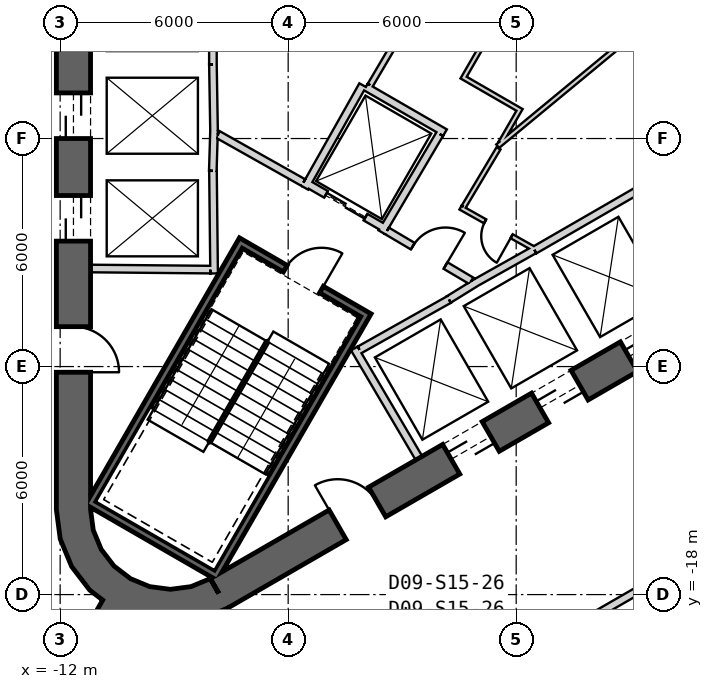
"""IFC4 building model, lengths in metres.
Left out: names, types, materials, properties, quantities, classifications, styles, units other than length and angle.
Written with IfcOpenShell. Run it as: python <this file> out.ifc"""

import sys

from ifc_helpers import new_model, si_unit, direction, frame, frame_2d, origin, place, context, subcontext, project, spatial, polyline, rectangle, outline, extrude, element, fill, save


model = new_model("IFC4")
c1 = context("Model", 3, precision=1e-05, world=origin(), true_north=direction((0.0, 1.0)))
c2 = subcontext(c1, "Body", "Model", "MODEL_VIEW")
j1 = project(units=[si_unit("LENGTHUNIT", "METRE"), si_unit("PLANEANGLEUNIT", "RADIAN")], contexts=[c1])
p1 = place(None, origin())
s1 = spatial("IfcSite", under=j1, at=p1, CompositionType="ELEMENT")
p2 = place(p1, origin())
s2 = spatial("IfcBuilding", under=s1, at=p2, CompositionType="ELEMENT")
p3 = place(p2, frame((0.0, 0.0, 241.2)))
s3 = spatial("IfcBuildingStorey", under=s2, at=p3, CompositionType="ELEMENT", Elevation=241.2)
p4 = place(p3, frame((-11.65, 15.762, 0.0), z_axis=(0.0, 0.0, 1.0), x_axis=(0.0, -1.0, 0.0)))
e1 = element("IfcWall", 1, at=p4, inside=s3, PredefinedType="SHEAR", context=c2, shape_type="SweptSolid", body=[
    extrude(rectangle(XDim=31.523, YDim=0.9, at=frame_2d((15.762, 0.0))), origin(), (0.0, 0.0, 1.0), 4.0),
])
p5 = place(p4, frame((7.062, 0.0, 0.0)))
e2 = element("IfcOpeningElement", 2, at=p5, cuts=e1, PredefinedType="OPENING", context=c2, shape_type="SweptSolid", body=[
    extrude(rectangle(XDim=1.2, YDim=2.4, at=frame_2d((0.6, 1.2))), frame((0.0, 0.46, 0.0), z_axis=(0.0, -1.0, 0.0), x_axis=(1.0, 0.0, 0.0)), (0.0, 0.0, 1.0), 0.92),
])
p6 = place(p4, frame((9.762, 0.0, 0.0)))
e3 = element("IfcOpeningElement", 3, at=p6, cuts=e1, PredefinedType="OPENING", context=c2, shape_type="SweptSolid", body=[
    extrude(rectangle(XDim=1.2, YDim=2.4, at=frame_2d((0.6, 1.2))), frame((0.0, 0.46, 0.0), z_axis=(0.0, -1.0, 0.0), x_axis=(1.0, 0.0, 0.0)), (0.0, 0.0, 1.0), 0.92),
])
p7 = place(p4, frame((12.462, 0.0, 0.0)))
e4 = element("IfcOpeningElement", 4, at=p7, cuts=e1, PredefinedType="OPENING", context=c2, shape_type="SweptSolid", body=[
    extrude(rectangle(XDim=1.2, YDim=2.4, at=frame_2d((0.6, 1.2))), frame((0.0, 0.46, 0.0), z_axis=(0.0, -1.0, 0.0), x_axis=(1.0, 0.0, 0.0)), (0.0, 0.0, 1.0), 0.92),
])
p8 = place(p4, frame((15.162, 0.0, 0.0)))
e5 = element("IfcOpeningElement", 5, at=p8, cuts=e1, PredefinedType="OPENING", context=c2, shape_type="SweptSolid", body=[
    extrude(rectangle(XDim=1.2, YDim=2.4, at=frame_2d((0.6, 1.2))), frame((0.0, 0.46, 0.0), z_axis=(0.0, -1.0, 0.0), x_axis=(1.0, 0.0, 0.0)), (0.0, 0.0, 1.0), 0.92),
])
p9 = place(p4, frame((17.862, 0.0, 0.0)))
e6 = element("IfcOpeningElement", 6, at=p9, cuts=e1, PredefinedType="OPENING", context=c2, shape_type="SweptSolid", body=[
    extrude(rectangle(XDim=1.2, YDim=2.4, at=frame_2d((0.6, 1.2))), frame((0.0, 0.46, 0.0), z_axis=(0.0, -1.0, 0.0), x_axis=(1.0, 0.0, 0.0)), (0.0, 0.0, 1.0), 0.92),
])
p10 = place(p4, frame((20.562, 0.0, 0.0)))
e7 = element("IfcOpeningElement", 7, at=p10, cuts=e1, PredefinedType="OPENING", context=c2, shape_type="SweptSolid", body=[
    extrude(rectangle(XDim=1.2, YDim=2.4, at=frame_2d((0.6, 1.2))), frame((0.0, 0.46, 0.0), z_axis=(0.0, -1.0, 0.0), x_axis=(1.0, 0.0, 0.0)), (0.0, 0.0, 1.0), 0.92),
])
p11 = place(p4, frame((23.262, 0.0, 0.0)))
e8 = element("IfcOpeningElement", 8, at=p11, cuts=e1, PredefinedType="OPENING", context=c2, shape_type="SweptSolid", body=[
    extrude(rectangle(XDim=1.2, YDim=2.4, at=frame_2d((0.6, 1.2))), frame((0.0, 0.46, 0.0), z_axis=(0.0, -1.0, 0.0), x_axis=(1.0, 0.0, 0.0)), (0.0, 0.0, 1.0), 0.92),
])
p12 = place(p4, frame((3.612, 0.0, 0.0)))
e9 = element("IfcOpeningElement", 9, at=p12, cuts=e1, PredefinedType="OPENING", context=c2, shape_type="SweptSolid", body=[
    extrude(rectangle(XDim=1.2, YDim=2.4, at=frame_2d((0.6, 1.2))), frame((0.0, 0.46, 0.0), z_axis=(0.0, -1.0, 0.0), x_axis=(1.0, 0.0, 0.0)), (0.0, 0.0, 1.0), 0.92),
])
p13 = place(p4, frame((26.712, 0.0, 0.0)))
e10 = element("IfcOpeningElement", 10, at=p13, cuts=e1, PredefinedType="OPENING", context=c2, shape_type="SweptSolid", body=[
    extrude(rectangle(XDim=1.2, YDim=2.4, at=frame_2d((0.6, 1.2))), frame((0.0, 0.46, 0.0), z_axis=(0.0, -1.0, 0.0), x_axis=(1.0, 0.0, 0.0)), (0.0, 0.0, 1.0), 0.92),
])
p14 = place(p3, frame((-7.825, -17.97, 0.0), z_axis=(0.0, 0.0, 1.0), x_axis=(0.866028369851, 0.499994862586, 0.0)))
e11 = element("IfcWall", 11, at=p14, inside=s3, PredefinedType="SHEAR", context=c2, shape_type="SweptSolid", body=[
    extrude(rectangle(XDim=31.523, YDim=0.9, at=frame_2d((15.762, 0.0))), origin(), (0.0, 0.0, 1.0), 4.0),
])
p15 = place(p14, frame((7.062, 0.0, 0.0)))
e12 = element("IfcOpeningElement", 12, at=p15, cuts=e11, PredefinedType="OPENING", context=c2, shape_type="SweptSolid", body=[
    extrude(rectangle(XDim=1.2, YDim=2.4, at=frame_2d((0.6, 1.2))), frame((0.0, 0.46, 0.0), z_axis=(0.0, -1.0, 0.0), x_axis=(1.0, 0.0, 0.0)), (0.0, 0.0, 1.0), 0.92),
])
p16 = place(p14, frame((9.762, 0.0, 0.0)))
e13 = element("IfcOpeningElement", 13, at=p16, cuts=e11, PredefinedType="OPENING", context=c2, shape_type="SweptSolid", body=[
    extrude(rectangle(XDim=1.2, YDim=2.4, at=frame_2d((0.6, 1.2))), frame((0.0, 0.46, 0.0), z_axis=(0.0, -1.0, 0.0), x_axis=(1.0, 0.0, 0.0)), (0.0, 0.0, 1.0), 0.92),
])
p17 = place(p14, frame((12.462, 0.0, 0.0)))
e14 = element("IfcOpeningElement", 14, at=p17, cuts=e11, PredefinedType="OPENING", context=c2, shape_type="SweptSolid", body=[
    extrude(rectangle(XDim=1.2, YDim=2.4, at=frame_2d((0.6, 1.2))), frame((0.0, 0.46, 0.0), z_axis=(0.0, -1.0, 0.0), x_axis=(1.0, 0.0, 0.0)), (0.0, 0.0, 1.0), 0.92),
])
p18 = place(p14, frame((15.162, 0.0, 0.0)))
e15 = element("IfcOpeningElement", 15, at=p18, cuts=e11, PredefinedType="OPENING", context=c2, shape_type="SweptSolid", body=[
    extrude(rectangle(XDim=1.2, YDim=2.4, at=frame_2d((0.6, 1.2))), frame((0.0, 0.46, 0.0), z_axis=(0.0, -1.0, 0.0), x_axis=(1.0, 0.0, 0.0)), (0.0, 0.0, 1.0), 0.92),
])
p19 = place(p14, frame((17.862, 0.0, 0.0)))
e16 = element("IfcOpeningElement", 16, at=p19, cuts=e11, PredefinedType="OPENING", context=c2, shape_type="SweptSolid", body=[
    extrude(rectangle(XDim=1.2, YDim=2.4, at=frame_2d((0.6, 1.2))), frame((0.0, 0.46, 0.0), z_axis=(0.0, -1.0, 0.0), x_axis=(1.0, 0.0, 0.0)), (0.0, 0.0, 1.0), 0.92),
])
p20 = place(p14, frame((20.562, 0.0, 0.0)))
e17 = element("IfcOpeningElement", 17, at=p20, cuts=e11, PredefinedType="OPENING", context=c2, shape_type="SweptSolid", body=[
    extrude(rectangle(XDim=1.2, YDim=2.4, at=frame_2d((0.6, 1.2))), frame((0.0, 0.46, 0.0), z_axis=(0.0, -1.0, 0.0), x_axis=(1.0, 0.0, 0.0)), (0.0, 0.0, 1.0), 0.92),
])
p21 = place(p14, frame((26.712, 0.0, 0.0)))
e18 = element("IfcOpeningElement", 18, at=p21, cuts=e11, PredefinedType="OPENING", context=c2, shape_type="SweptSolid", body=[
    extrude(rectangle(XDim=1.2, YDim=2.4, at=frame_2d((0.6, 1.2))), frame((0.0, 0.46, 0.0), z_axis=(0.0, -1.0, 0.0), x_axis=(1.0, 0.0, 0.0)), (0.0, 0.0, 1.0), 0.92),
])
p22 = place(p14, frame((3.612, 0.0, 0.0)))
e19 = element("IfcOpeningElement", 19, at=p22, cuts=e11, PredefinedType="OPENING", context=c2, shape_type="SweptSolid", body=[
    extrude(rectangle(XDim=1.2, YDim=2.4, at=frame_2d((0.6, 1.2))), frame((0.0, 0.46, 0.0), z_axis=(0.0, -1.0, 0.0), x_axis=(1.0, 0.0, 0.0)), (0.0, 0.0, 1.0), 0.92),
])
p23 = place(p3, origin())
e20 = element("IfcWall", 20, at=p23, inside=s3, PredefinedType="SHEAR", context=c2, shape_type="SweptSolid", body=[
    extrude(outline(polyline([(-12.1, -15.762), (-11.998, -16.538), (-11.698, -17.262), (-11.221, -17.883), (-10.6, -18.36), (-9.876, -18.659), (-9.1, -18.762), (-8.323, -18.659), (-7.6, -18.36), (-8.05, -17.58), (-8.556, -17.79), (-9.1, -17.862), (-9.644, -17.79), (-10.15, -17.58), (-10.585, -17.247), (-10.919, -16.812), (-11.128, -16.305), (-11.2, -15.762), (-12.1, -15.762)])), origin(), (0.0, 0.0, 1.0), 4.0),
])
p24 = place(p3, frame((-10.575, -18.316, 0.0), z_axis=(0.0, 0.0, 1.0), x_axis=(-0.500002931134, -0.866023711487, 0.0)))
e21 = element("IfcWall", 21, at=p24, inside=s3, PredefinedType="SHEAR", context=c2, shape_type="SweptSolid", body=[
    extrude(rectangle(XDim=10.9, YDim=0.7, at=frame_2d((5.45, 0.0))), origin(), (0.0, 0.0, 1.0), 4.0),
])
p25 = place(p3, frame((-7.98, 4.05, 0.0), z_axis=(0.0, 0.0, 1.0), x_axis=(0.0, -1.0, 0.0)))
e22 = element("IfcWall", 22, at=p25, inside=s3, PredefinedType="PLUMBINGWALL", context=c2, shape_type="SweptSolid", body=[
    extrude(rectangle(XDim=8.1, YDim=0.2, at=frame_2d((4.05, 0.0))), origin(), (0.0, 0.0, 1.0), 3.7),
])
p26 = place(p3, frame((-7.95, -5.772, 0.0), z_axis=(0.0, 0.0, 1.0), x_axis=(-0.030803413295, -0.999525462272, 0.0)))
e23 = element("IfcWall", 23, at=p26, inside=s3, PredefinedType="PLUMBINGWALL", context=c2, shape_type="SweptSolid", body=[
    extrude(rectangle(XDim=1.078, YDim=0.2, at=frame_2d((0.539, 0.0))), origin(), (0.0, 0.0, 1.0), 3.7),
])
p27 = place(p3, frame((-7.98, -4.05, 0.0), z_axis=(0.0, 0.0, 1.0), x_axis=(0.016809909365, -0.999858703491, 0.0)))
e24 = element("IfcWall", 24, at=p27, inside=s3, PredefinedType="PLUMBINGWALL", context=c2, shape_type="SweptSolid", body=[
    extrude(rectangle(XDim=1.844, YDim=0.2, at=frame_2d((0.922, 0.0))), origin(), (0.0, 0.0, 1.0), 3.7),
])
p28 = place(p3, frame((-7.979, -6.85, 0.0), z_axis=(0.0, 0.0, 1.0), x_axis=(0.011121475088, -0.999938154483, 0.0)))
e25 = element("IfcWall", 25, at=p28, inside=s3, PredefinedType="PLUMBINGWALL", context=c2, shape_type="SweptSolid", body=[
    extrude(rectangle(XDim=2.7, YDim=0.2, at=frame_2d((1.35, 0.0))), origin(), (0.0, 0.0, 1.0), 3.7),
])
p29 = place(p3, frame((-8.05, -9.449, 0.0), z_axis=(0.0, 0.0, 1.0), x_axis=(-0.999957467379, 0.009222983926, 0.0)))
e26 = element("IfcWall", 26, at=p29, inside=s3, PredefinedType="PLUMBINGWALL", context=c2, shape_type="SweptSolid", body=[
    extrude(rectangle(XDim=3.15, YDim=0.2, at=frame_2d((1.575, 0.0))), origin(), (0.0, 0.0, 1.0), 3.7),
])
p30 = place(p3, frame((0.483, -8.936, 0.0), z_axis=(0.0, 0.0, 1.0), x_axis=(0.866030989016, 0.499990325971, 0.0)))
e27 = element("IfcWall", 27, at=p30, inside=s3, PredefinedType="PLUMBINGWALL", context=c2, shape_type="SweptSolid", body=[
    extrude(rectangle(XDim=8.1, YDim=0.2, at=frame_2d((4.05, 0.0))), origin(), (0.0, 0.0, 1.0), 3.7),
])
p31 = place(p3, frame((-2.558, -14.409, 0.0), z_axis=(0.0, 0.0, 1.0), x_axis=(-0.507997497166, 0.861358544901, 0.0)))
e28 = element("IfcWall", 28, at=p31, inside=s3, PredefinedType="PLUMBINGWALL", context=c2, shape_type="SweptSolid", body=[
    extrude(rectangle(XDim=3.35, YDim=0.2, at=frame_2d((1.675, 0.0))), origin(), (0.0, 0.0, 1.0), 3.7),
])
p32 = place(p3, frame((-1.769, -10.237, 0.0), z_axis=(0.0, 0.0, 1.0), x_axis=(-0.871534483978, -0.490334215854, 0.0)))
e29 = element("IfcWall", 29, at=p32, inside=s3, PredefinedType="PLUMBINGWALL", context=c2, shape_type="SweptSolid", body=[
    extrude(rectangle(XDim=2.7, YDim=0.2, at=frame_2d((1.35, 0.0))), origin(), (0.0, 0.0, 1.0), 3.7),
])
p33 = place(p3, frame((-1.024, -9.771, 0.0), z_axis=(0.0, 0.0, 1.0), x_axis=(-0.850348075135, -0.526220629693, 0.0)))
e30 = element("IfcWall", 30, at=p33, inside=s3, PredefinedType="PLUMBINGWALL", context=c2, shape_type="SweptSolid", body=[
    extrude(rectangle(XDim=0.878, YDim=0.2, at=frame_2d((0.439, 0.0))), origin(), (0.0, 0.0, 1.0), 3.7),
])
p34 = place(p3, frame((-1.13, -9.832, 0.0), z_axis=(0.0, 0.0, 1.0), x_axis=(0.871988740738, 0.489525929882, 0.0)))
e31 = element("IfcWall", 31, at=p34, inside=s3, PredefinedType="PLUMBINGWALL", context=c2, shape_type="SweptSolid", body=[
    extrude(rectangle(XDim=1.845, YDim=0.2, at=frame_2d((0.922, 0.0))), origin(), (0.0, 0.0, 1.0), 3.7),
])
p35 = place(p3, frame((-3.905, -10.563, -0.3), z_axis=(0.0, 0.0, 1.0), x_axis=(-0.500012932018, -0.866017937352, 0.0)))
e32 = element("IfcWall", 32, at=p35, inside=s3, PredefinedType="SHEAR", context=c2, shape_type="SweptSolid", body=[
    extrude(rectangle(XDim=8.1, YDim=0.2, at=frame_2d((4.05, 0.0))), origin(), (0.0, 0.0, 1.0), 4.0),
])
p36 = place(p3, frame((-11.282, -15.541, -0.3), z_axis=(0.0, 0.0, 1.0), x_axis=(0.866000483506, -0.500043160704, 0.0)))
e33 = element("IfcWall", 33, at=p36, inside=s3, PredefinedType="SHEAR", context=c2, shape_type="SweptSolid", body=[
    extrude(rectangle(XDim=3.8, YDim=0.2, at=frame_2d((1.9, 0.0))), origin(), (0.0, 0.0, 1.0), 4.0),
])
p37 = place(p3, frame((-7.196, -8.663, -0.3), z_axis=(0.0, 0.0, 1.0), x_axis=(-0.499997992926, -0.866026562566, 0.0)))
e34 = element("IfcWall", 34, at=p37, inside=s3, PredefinedType="SHEAR", context=c2, shape_type="SweptSolid", body=[
    extrude(rectangle(XDim=7.9, YDim=0.2, at=frame_2d((3.95, 0.0))), origin(), (0.0, 0.0, 1.0), 4.0),
])
p38 = place(p3, frame((-4.041, -10.599, -0.3), z_axis=(0.0, 0.0, 1.0), x_axis=(-0.866047807691, 0.499961193289, 0.0)))
e35 = element("IfcWall", 35, at=p38, inside=s3, PredefinedType="SHEAR", context=c2, shape_type="SweptSolid", body=[
    extrude(rectangle(XDim=3.6, YDim=0.2, at=frame_2d((1.8, 0.0))), origin(), (0.0, 0.0, 1.0), 4.0),
])
p39 = place(p38, frame((1.25, 0.0, 0.3)))
e36 = element("IfcOpeningElement", 36, at=p39, cuts=e35, PredefinedType="OPENING", context=c2, shape_type="SweptSolid", body=[
    extrude(rectangle(XDim=1.1, YDim=2.1, at=frame_2d((0.55, 1.05))), frame((0.0, 0.11, 0.0), z_axis=(0.0, -1.0, 0.0), x_axis=(1.0, 0.0, 0.0)), (0.0, 0.0, 1.0), 0.22),
])
p40 = place(p3, frame((-3.446, -8.368, 0.0), z_axis=(0.0, 0.0, 1.0), x_axis=(-0.866024647952, 0.500001309137, 0.0)))
e37 = element("IfcWall", 37, at=p40, inside=s3, PredefinedType="PLUMBINGWALL", context=c2, shape_type="SweptSolid", body=[
    extrude(rectangle(XDim=2.4, YDim=0.2, at=frame_2d((1.2, 0.0))), origin(), (0.0, 0.0, 1.0), 3.7),
])
p41 = place(p40, frame((0.6, 0.0, 0.0)))
e38 = element("IfcOpeningElement", 38, at=p41, cuts=e37, PredefinedType="OPENING", context=c2, shape_type="SweptSolid", body=[
    extrude(rectangle(XDim=1.2, YDim=2.4, at=frame_2d((0.6, 1.2))), frame((0.0, 0.11, 0.0), z_axis=(0.0, -1.0, 0.0), x_axis=(1.0, 0.0, 0.0)), (0.0, 0.0, 1.0), 0.22),
])
p42 = place(p3, frame((-5.562, -7.296, 0.0), z_axis=(0.0, 0.0, 1.0), x_axis=(0.491322718731, 0.870977603649, 0.0)))
e39 = element("IfcWall", 39, at=p42, inside=s3, PredefinedType="PLUMBINGWALL", context=c2, shape_type="SweptSolid", body=[
    extrude(rectangle(XDim=3.1, YDim=0.2, at=frame_2d((1.55, 0.0))), origin(), (0.0, 0.0, 1.0), 3.7),
])
p43 = place(p3, frame((-3.957, -4.644, 0.0), z_axis=(0.0, 0.0, 1.0), x_axis=(0.865991127953, -0.500059362782, 0.0)))
e40 = element("IfcWall", 40, at=p43, inside=s3, PredefinedType="PLUMBINGWALL", context=c2, shape_type="SweptSolid", body=[
    extrude(rectangle(XDim=2.405, YDim=0.2, at=frame_2d((1.202, 0.0))), origin(), (0.0, 0.0, 1.0), 3.7),
])
p44 = place(p3, frame((-2.012, -5.882, 0.0), z_axis=(0.0, 0.0, 1.0), x_axis=(-0.508619639323, -0.860991325447, 0.0)))
e41 = element("IfcWall", 41, at=p44, inside=s3, PredefinedType="PLUMBINGWALL", context=c2, shape_type="SweptSolid", body=[
    extrude(rectangle(XDim=3.0, YDim=0.2, at=frame_2d((1.5, 0.0))), origin(), (0.0, 0.0, 1.0), 3.7),
])
p45 = place(p3, frame((-7.849, -5.894, 0.0), z_axis=(0.0, 0.0, 1.0), x_axis=(0.871340486379, -0.490678873396, 0.0)))
e42 = element("IfcWall", 42, at=p45, inside=s3, PredefinedType="PARTITIONING", context=c2, shape_type="SweptSolid", body=[
    extrude(rectangle(XDim=2.581, YDim=0.2, at=frame_2d((1.291, 0.0))), origin(), (0.0, 0.0, 1.0), 3.7),
])
p46 = place(p3, frame((-3.401, -8.43, 0.0), z_axis=(0.0, 0.0, 1.0), x_axis=(0.860598681535, -0.509283721849, 0.0)))
e43 = element("IfcWall", 43, at=p46, inside=s3, PredefinedType="PARTITIONING", context=c2, shape_type="SweptSolid", body=[
    extrude(rectangle(XDim=2.581, YDim=0.2, at=frame_2d((1.291, 0.0))), origin(), (0.0, 0.0, 1.0), 3.7),
])
p47 = place(p46, frame((0.791, 0.0, 0.0)))
e44 = element("IfcOpeningElement", 44, at=p47, cuts=e43, PredefinedType="OPENING", context=c2, shape_type="SweptSolid", body=[
    extrude(rectangle(XDim=1.0, YDim=2.1, at=frame_2d((0.5, 1.05))), frame((0.0, 0.11, 0.0), z_axis=(0.0, -1.0, 0.0), x_axis=(1.0, 0.0, 0.0)), (0.0, 0.0, 1.0), 0.22),
])
p48 = place(p3, frame((-3.841, -4.595, 0.0), z_axis=(0.0, 0.0, 1.0), x_axis=(0.507318157939, 0.861758833216, 0.0)))
e45 = element("IfcWall", 45, at=p48, inside=s3, PredefinedType="PLUMBINGWALL", context=c2, shape_type="SweptSolid", body=[
    extrude(rectangle(XDim=3.365, YDim=0.15, at=frame_2d((1.682, 0.0))), origin(), (0.0, 0.0, 1.0), 3.7),
])
p49 = place(p3, frame((5.936, -0.894, 0.0), z_axis=(0.0, 0.0, 1.0), x_axis=(-0.770832870475, -0.637037428881, 0.0)))
e46 = element("IfcWall", 46, at=p49, inside=s3, PredefinedType="PARTITIONING", context=c2, shape_type="SweptSolid", body=[
    extrude(rectangle(XDim=8.332, YDim=0.12, at=frame_2d((4.166, 0.0))), origin(), (0.0, 0.0, 1.0), 3.7),
])
p50 = place(p3, frame((-0.411, -6.111, 0.0), z_axis=(0.0, 0.0, 1.0), x_axis=(0.49986229611, 0.866104892567, 0.0)))
e47 = element("IfcWall", 47, at=p50, inside=s3, PredefinedType="PARTITIONING", context=c2, shape_type="SweptSolid", body=[
    extrude(rectangle(XDim=1.058, YDim=0.12, at=frame_2d((0.529, 0.0))), origin(), (0.0, 0.0, 1.0), 3.7),
])
p51 = place(p3, frame((-1.436, -4.367, 0.0), z_axis=(0.0, 0.0, 1.0), x_axis=(0.866087547558, -0.499892348375, 0.0)))
e48 = element("IfcWall", 48, at=p51, inside=s3, PredefinedType="PARTITIONING", context=c2, shape_type="SweptSolid", body=[
    extrude(rectangle(XDim=1.7, YDim=0.12, at=frame_2d((0.85, 0.0))), origin(), (0.0, 0.0, 1.0), 3.7),
])
p52 = place(p3, frame((-0.338, -2.585, 0.0), z_axis=(0.0, 0.0, 1.0), x_axis=(-0.50002743572, -0.866009563185, 0.0)))
e49 = element("IfcWall", 49, at=p52, inside=s3, PredefinedType="PARTITIONING", context=c2, shape_type="SweptSolid", body=[
    extrude(rectangle(XDim=2.033, YDim=0.12, at=frame_2d((1.016, 0.0))), origin(), (0.0, 0.0, 1.0), 3.7),
])
p53 = place(p3, frame((-1.464, -7.816, 0.0), z_axis=(0.0, 0.0, 1.0), x_axis=(0.871880202732, -0.489719217597, 0.0)))
e50 = element("IfcWall", 50, at=p53, inside=s3, PredefinedType="PARTITIONING", context=c2, shape_type="SweptSolid", body=[
    extrude(rectangle(XDim=2.224, YDim=0.12, at=frame_2d((1.112, 0.0))), origin(), (0.0, 0.0, 1.0), 3.7),
])
p54 = place(p53, frame((0.742, 0.0, 0.0)))
e51 = element("IfcOpeningElement", 51, at=p54, cuts=e50, PredefinedType="OPENING", context=c2, shape_type="SweptSolid", body=[
    extrude(rectangle(XDim=0.8, YDim=2.1, at=frame_2d((0.4, 1.05))), frame((0.0, 0.07, 0.0), z_axis=(0.0, -1.0, 0.0), x_axis=(1.0, 0.0, 0.0)), (0.0, 0.0, 1.0), 0.14),
])
p55 = place(p3, frame((-0.463, -6.257, 0.0), z_axis=(0.0, 0.0, 1.0), x_axis=(-0.512528878122, -0.858669988466, 0.0)))
e52 = element("IfcWall", 52, at=p55, inside=s3, PredefinedType="PARTITIONING", context=c2, shape_type="SweptSolid", body=[
    extrude(rectangle(XDim=1.79, YDim=0.12, at=frame_2d((0.895, 0.0))), origin(), (0.0, 0.0, 1.0), 3.7),
])
p56 = place(p3, frame((-0.223, -19.874, 0.0), z_axis=(0.0, 0.0, 1.0), x_axis=(0.866025366729, 0.500000064182, 0.0)))
e53 = element("IfcWall", 53, at=p56, inside=s3, PredefinedType="PARTITIONING", context=c2, shape_type="SweptSolid", body=[
    extrude(rectangle(XDim=12.18, YDim=0.2, at=frame_2d((6.09, 0.0))), origin(), (0.0, 0.0, 1.0), 3.07),
])
p57 = place(p39, origin())
e54 = element("IfcDoor", 54, at=p57, inside=s3, OperationType="SINGLE_SWING_RIGHT", PredefinedType="USERDEFINED", context=c2, shape_type="SweptSolid", body=[
    extrude(rectangle(XDim=1.1, YDim=2.1, at=frame_2d((0.55, 1.05))), frame((0.0, 0.025, 0.0), z_axis=(0.0, -1.0, 0.0), x_axis=(1.0, 0.0, 0.0)), (0.0, 0.0, 1.0), 0.05),
])
fill(e36, e54)
p58 = place(p47, origin())
e55 = element("IfcDoor", 55, at=p58, inside=s3, OperationType="SINGLE_SWING_RIGHT", PredefinedType="USERDEFINED", context=c2, shape_type="SweptSolid", body=[
    extrude(rectangle(XDim=1.0, YDim=2.1, at=frame_2d((0.5, 1.05))), frame((0.0, 0.025, 0.0), z_axis=(0.0, -1.0, 0.0), x_axis=(1.0, 0.0, 0.0)), (0.0, 0.0, 1.0), 0.05),
])
fill(e44, e55)
p59 = place(p41, origin())
e56 = element("IfcDoor", 56, at=p59, inside=s3, OperationType="SLIDING_TO_LEFT", PredefinedType="USERDEFINED", context=c2, shape_type="SweptSolid", body=[
    extrude(rectangle(XDim=1.2, YDim=2.4, at=frame_2d((0.6, 1.2))), frame((0.0, 0.025, 0.0), z_axis=(0.0, -1.0, 0.0), x_axis=(1.0, 0.0, 0.0)), (0.0, 0.0, 1.0), 0.05),
])
fill(e38, e56)
p60 = place(p54, origin())
e57 = element("IfcDoor", 57, at=p60, inside=s3, OperationType="SINGLE_SWING_LEFT", PredefinedType="USERDEFINED", context=c2, shape_type="SweptSolid", body=[
    extrude(rectangle(XDim=0.8, YDim=2.1, at=frame_2d((0.4, 1.05))), frame((0.0, 0.025, 0.0), z_axis=(0.0, -1.0, 0.0), x_axis=(1.0, 0.0, 0.0)), (0.0, 0.0, 1.0), 0.05),
])
fill(e51, e57)
p61 = place(p10, origin())
e58 = element("IfcDoor", 58, at=p61, inside=s3, OperationType="SLIDING_TO_LEFT", PredefinedType="USERDEFINED", context=c2, shape_type="SweptSolid", body=[
    extrude(rectangle(XDim=1.2, YDim=2.4, at=frame_2d((0.6, 1.2))), frame((0.0, 0.025, 0.0), z_axis=(0.0, -1.0, 0.0), x_axis=(1.0, 0.0, 0.0)), (0.0, 0.0, 1.0), 0.05),
])
fill(e7, e58)
p62 = place(p11, origin())
e59 = element("IfcDoor", 59, at=p62, inside=s3, OperationType="SLIDING_TO_LEFT", PredefinedType="USERDEFINED", context=c2, shape_type="SweptSolid", body=[
    extrude(rectangle(XDim=1.2, YDim=2.4, at=frame_2d((0.6, 1.2))), frame((0.0, 0.025, 0.0), z_axis=(0.0, -1.0, 0.0), x_axis=(1.0, 0.0, 0.0)), (0.0, 0.0, 1.0), 0.05),
])
fill(e8, e59)
p63 = place(p15, origin())
e60 = element("IfcDoor", 60, at=p63, inside=s3, OperationType="SLIDING_TO_LEFT", PredefinedType="USERDEFINED", context=c2, shape_type="SweptSolid", body=[
    extrude(rectangle(XDim=1.2, YDim=2.4, at=frame_2d((0.6, 1.2))), frame((0.0, 0.025, 0.0), z_axis=(0.0, -1.0, 0.0), x_axis=(1.0, 0.0, 0.0)), (0.0, 0.0, 1.0), 0.05),
])
fill(e12, e60)
p64 = place(p16, origin())
e61 = element("IfcDoor", 61, at=p64, inside=s3, OperationType="SLIDING_TO_LEFT", PredefinedType="USERDEFINED", context=c2, shape_type="SweptSolid", body=[
    extrude(rectangle(XDim=1.2, YDim=2.4, at=frame_2d((0.6, 1.2))), frame((0.0, 0.025, 0.0), z_axis=(0.0, -1.0, 0.0), x_axis=(1.0, 0.0, 0.0)), (0.0, 0.0, 1.0), 0.05),
])
fill(e13, e61)
p65 = place(p17, origin())
e62 = element("IfcDoor", 62, at=p65, inside=s3, OperationType="SLIDING_TO_LEFT", PredefinedType="USERDEFINED", context=c2, shape_type="SweptSolid", body=[
    extrude(rectangle(XDim=1.2, YDim=2.4, at=frame_2d((0.6, 1.2))), frame((0.0, 0.025, 0.0), z_axis=(0.0, -1.0, 0.0), x_axis=(1.0, 0.0, 0.0)), (0.0, 0.0, 1.0), 0.05),
])
fill(e14, e62)
p66 = place(p13, origin())
e63 = element("IfcDoor", 63, at=p66, inside=s3, OperationType="SINGLE_SWING_RIGHT", PredefinedType="USERDEFINED", context=c2, shape_type="SweptSolid", body=[
    extrude(rectangle(XDim=1.2, YDim=2.4, at=frame_2d((0.6, 1.2))), frame((0.0, 0.025, 0.0), z_axis=(0.0, -1.0, 0.0), x_axis=(1.0, 0.0, 0.0)), (0.0, 0.0, 1.0), 0.05),
])
fill(e10, e63)
p67 = place(p22, origin())
e64 = element("IfcDoor", 64, at=p67, inside=s3, OperationType="SINGLE_SWING_RIGHT", PredefinedType="USERDEFINED", context=c2, shape_type="SweptSolid", body=[
    extrude(rectangle(XDim=1.2, YDim=2.4, at=frame_2d((0.6, 1.2))), frame((0.0, 0.025, 0.0), z_axis=(0.0, -1.0, 0.0), x_axis=(1.0, 0.0, 0.0)), (0.0, 0.0, 1.0), 0.05),
])
fill(e19, e64)
save(model, sys.argv[1])
